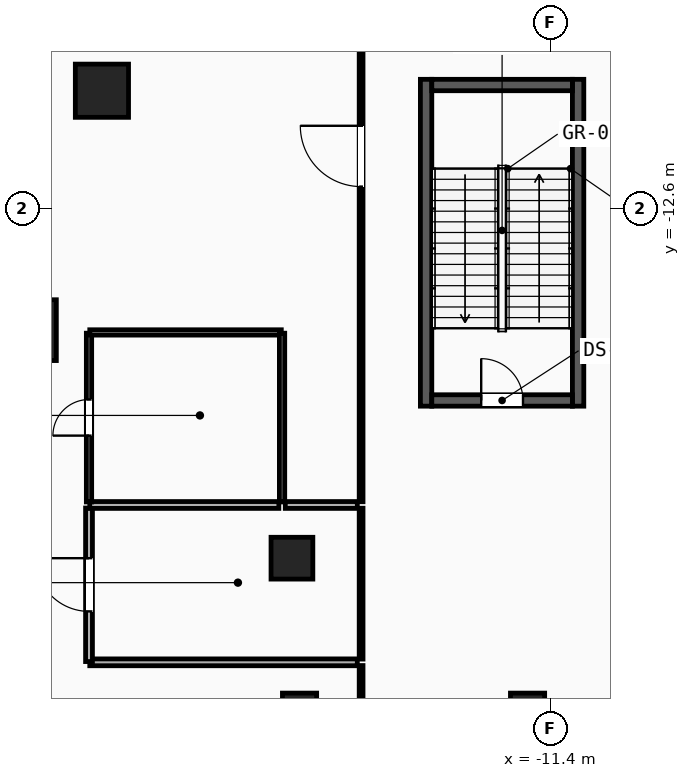
"""IFC4 building model, lengths in metres.
Left out: names, types, materials, properties, quantities, classifications, styles, units other than length and angle.
Written with IfcOpenShell. Run it as: python <this file> out.ifc"""

import sys

from ifc_helpers import new_model, si_unit, direction, frame, frame_2d, origin, origin_2d, place, context, subcontext, project, spatial, rectangle, circle, extrude, element, fill, save


model = new_model("IFC4")
c1 = context("Model", 3, precision=1e-05, world=origin(), true_north=direction((0.0, 1.0)))
c2 = subcontext(c1, "Body", "Model", "MODEL_VIEW")
j1 = project(units=[si_unit("LENGTHUNIT", "METRE"), si_unit("PLANEANGLEUNIT", "RADIAN")], contexts=[c1])
p1 = place(None, origin())
s1 = spatial("IfcSite", under=j1, at=p1, CompositionType="ELEMENT")
p2 = place(p1, origin())
s2 = spatial("IfcBuilding", under=s1, at=p2, CompositionType="ELEMENT")
p3 = place(p2, origin())
s3 = spatial("IfcBuildingStorey", under=s2, at=p3, CompositionType="ELEMENT", Elevation=0.0)
p4 = place(p3, frame((-23.2, -9.5, 0.0), z_axis=(0.0, 0.0, 1.0), x_axis=(1.0, 0.0, 0.0)))
e1 = element("IfcColumn", 1, at=p4, inside=s3, PredefinedType="COLUMN", context=c2, shape_type="SweptSolid", body=[
    extrude(rectangle(XDim=1.4, YDim=1.4, at=origin_2d()), origin(), (0.0, 0.0, 1.0), 6.0),
])
p5 = place(p3, frame((-25.2, -15.8, 0.0), z_axis=(0.0, 0.0, 1.0), x_axis=(1.0, 0.0, 0.0)))
e2 = element("IfcColumn", 2, at=p5, inside=s3, PredefinedType="COLUMN", context=c2, shape_type="SweptSolid", body=[
    extrude(rectangle(XDim=1.6, YDim=1.6, at=origin_2d()), origin(), (0.0, 0.0, 1.0), 6.0),
])
p6 = place(p3, frame((-18.2, -21.8, 0.0), z_axis=(0.0, 0.0, 1.0), x_axis=(1.0, 0.0, 0.0)))
e3 = element("IfcColumn", 3, at=p6, inside=s3, PredefinedType="PILASTER", context=c2, shape_type="SweptSolid", body=[
    extrude(circle(Radius=0.55, at=origin_2d()), origin(), (0.0, 0.0, 1.0), 6.0),
])
for number, where, z_axis, x_axis in (
    (4, (-18.0, -25.8, 0.0), (0.0, 0.0, 1.0), (1.0, 0.0, 0.0)),
    (5, (-12.0, -25.8, 0.0), (0.0, 0.0, 1.0), (1.0, 0.0, 0.0)),
):
    element("IfcColumn", number, at=place(p3, frame(where, z_axis=z_axis, x_axis=x_axis)), inside=s3, PredefinedType="COLUMN", context=c2, shape_type="SweptSolid", body=[
        extrude(rectangle(XDim=0.9, YDim=0.9, at=origin_2d()), origin(), (0.0, 0.0, 1.0), 5.65),
    ])
for number, where, z_axis, x_axis in (
    (6, (-14.67, -17.8, 0.0), (0.0, 0.0, 1.0), (0.0, 1.0, 0.0)),
    (7, (-10.67, -17.8, 0.0), (0.0, 0.0, 1.0), (0.0, 1.0, 0.0)),
):
    element("IfcWall", number, at=place(p3, frame(where, z_axis=z_axis, x_axis=x_axis)), inside=s3, PredefinedType="SHEAR", context=c2, shape_type="SweptSolid", body=[
        extrude(rectangle(XDim=8.6, YDim=0.3, at=frame_2d((4.3, 0.0))), origin(), (0.0, 0.0, 1.0), 5.65),
    ])
p7 = place(p3, frame((-14.52, -17.65, 0.0), z_axis=(0.0, 0.0, 1.0), x_axis=(1.0, 0.0, 0.0)))
e8 = element("IfcWall", 8, at=p7, inside=s3, PredefinedType="SHEAR", context=c2, shape_type="SweptSolid", body=[
    extrude(rectangle(XDim=3.7, YDim=0.3, at=frame_2d((1.85, 0.0))), origin(), (0.0, 0.0, 1.0), 5.65),
])
p8 = place(p7, frame((1.3, 0.0, 0.0)))
e9 = element("IfcOpeningElement", 9, at=p8, cuts=e8, PredefinedType="OPENING", context=c2, shape_type="SweptSolid", body=[
    extrude(rectangle(XDim=1.1, YDim=2.15, at=frame_2d((0.55, 1.075))), frame((0.0, 0.16, 0.0), z_axis=(0.0, -1.0, 0.0), x_axis=(1.0, 0.0, 0.0)), (0.0, 0.0, 1.0), 0.32),
])
p9 = place(p3, frame((-14.52, -9.35, 0.0), z_axis=(0.0, 0.0, 1.0), x_axis=(1.0, 0.0, 0.0)))
e10 = element("IfcWall", 10, at=p9, inside=s3, PredefinedType="SHEAR", context=c2, shape_type="SweptSolid", body=[
    extrude(rectangle(XDim=3.7, YDim=0.3, at=frame_2d((1.85, 0.0))), origin(), (0.0, 0.0, 1.0), 5.65),
])
p10 = place(p3, frame((-23.52, -24.54, 0.0), z_axis=(0.0, 0.0, 1.0), x_axis=(1.0, 0.0, 0.0)))
e11 = element("IfcWall", 11, at=p10, inside=s3, PredefinedType="PARTITIONING", context=c2, shape_type="SweptSolid", body=[
    extrude(rectangle(XDim=7.04, YDim=0.18, at=frame_2d((3.52, 0.0))), origin(), (0.0, 0.0, 1.0), 5.65),
])
p11 = place(p3, frame((-23.54, -24.52, 0.0), z_axis=(0.0, 0.0, 1.0), x_axis=(0.0, 1.0, 0.0)))
e12 = element("IfcWall", 12, at=p11, inside=s3, PredefinedType="PARTITIONING", context=c2, shape_type="SweptSolid", body=[
    extrude(rectangle(XDim=4.04, YDim=0.18, at=frame_2d((2.02, 0.0))), origin(), (0.0, 0.0, 1.0), 5.65),
])
p12 = place(p11, frame((1.32, 0.0, 0.0)))
e13 = element("IfcOpeningElement", 13, at=p12, cuts=e12, PredefinedType="OPENING", context=c2, shape_type="SweptSolid", body=[
    extrude(rectangle(XDim=1.4, YDim=2.2, at=frame_2d((0.7, 1.1))), frame((0.0, 0.1, 0.0), z_axis=(0.0, -1.0, 0.0), x_axis=(1.0, 0.0, 0.0)), (0.0, 0.0, 1.0), 0.2),
])
p13 = place(p3, frame((-23.52, -20.4, 0.0), z_axis=(0.0, 0.0, 1.0), x_axis=(1.0, 0.0, 0.0)))
e14 = element("IfcWall", 14, at=p13, inside=s3, PredefinedType="PARTITIONING", context=c2, shape_type="SweptSolid", body=[
    extrude(rectangle(XDim=4.975, YDim=0.18, at=frame_2d((2.488, 0.0))), origin(), (0.0, 0.0, 1.0), 5.65),
])
p14 = place(p3, frame((-18.375, -20.4, 0.0), z_axis=(0.0, 0.0, 1.0), x_axis=(1.0, 0.0, 0.0)))
e15 = element("IfcWall", 15, at=p14, inside=s3, PredefinedType="PARTITIONING", context=c2, shape_type="SweptSolid", body=[
    extrude(rectangle(XDim=1.895, YDim=0.18, at=frame_2d((0.948, 0.0))), origin(), (0.0, 0.0, 1.0), 5.65),
])
p15 = place(p3, frame((-23.54, -20.32, 0.0), z_axis=(0.0, 0.0, 1.0), x_axis=(0.0, 1.0, 0.0)))
e16 = element("IfcWall", 16, at=p15, inside=s3, PredefinedType="PARTITIONING", context=c2, shape_type="SweptSolid", body=[
    extrude(rectangle(XDim=4.44, YDim=0.14, at=frame_2d((2.22, 0.0))), origin(), (0.0, 0.0, 1.0), 5.65),
])
p16 = place(p15, frame((1.745, 0.0, 0.0)))
e17 = element("IfcOpeningElement", 17, at=p16, cuts=e16, PredefinedType="OPENING", context=c2, shape_type="SweptSolid", body=[
    extrude(rectangle(XDim=0.95, YDim=2.1, at=frame_2d((0.475, 1.05))), frame((0.0, 0.08, 0.0), z_axis=(0.0, -1.0, 0.0), x_axis=(1.0, 0.0, 0.0)), (0.0, 0.0, 1.0), 0.16),
])
p17 = place(p3, frame((-23.52, -15.86, 0.0), z_axis=(0.0, 0.0, 1.0), x_axis=(1.0, 0.0, 0.0)))
e18 = element("IfcWall", 18, at=p17, inside=s3, PredefinedType="PARTITIONING", context=c2, shape_type="SweptSolid", body=[
    extrude(rectangle(XDim=5.04, YDim=0.14, at=frame_2d((2.52, 0.0))), origin(), (0.0, 0.0, 1.0), 5.65),
])
p18 = place(p3, frame((-18.46, -20.32, 0.0), z_axis=(0.0, 0.0, 1.0), x_axis=(0.0, 1.0, 0.0)))
e19 = element("IfcWall", 19, at=p18, inside=s3, PredefinedType="PARTITIONING", context=c2, shape_type="SweptSolid", body=[
    extrude(rectangle(XDim=4.44, YDim=0.14, at=frame_2d((2.22, 0.0))), origin(), (0.0, 0.0, 1.0), 5.65),
])
p19 = place(p3, frame((-16.38, -28.745, 0.0), z_axis=(0.0, 0.0, 1.0), x_axis=(0.0, 1.0, 0.0)))
e20 = element("IfcWall", 20, at=p19, inside=s3, PredefinedType="PARTITIONING", context=c2, shape_type="SweptSolid", body=[
    extrude(rectangle(XDim=4.12, YDim=0.1, at=frame_2d((2.06, 0.0))), origin(), (0.0, 0.0, 1.0), 5.65),
])
p20 = place(p3, frame((-16.38, -24.455, 0.0), z_axis=(0.0, 0.0, 1.0), x_axis=(0.0, 1.0, 0.0)))
e21 = element("IfcWall", 21, at=p20, inside=s3, PredefinedType="PARTITIONING", context=c2, shape_type="SweptSolid", body=[
    extrude(rectangle(XDim=3.97, YDim=0.1, at=frame_2d((1.985, 0.0))), origin(), (0.0, 0.0, 1.0), 5.65),
])
p21 = place(p3, frame((-16.38, -20.315, 0.0), z_axis=(0.0, 0.0, 1.0), x_axis=(0.0, 1.0, 0.0)))
e22 = element("IfcWall", 22, at=p21, inside=s3, PredefinedType="PARTITIONING", context=c2, shape_type="SweptSolid", body=[
    extrude(rectangle(XDim=18.185, YDim=0.1, at=frame_2d((9.093, 0.0))), origin(), (0.0, 0.0, 1.0), 5.65),
])
p22 = place(p21, frame((8.292, 0.0, 0.0)))
e23 = element("IfcOpeningElement", 23, at=p22, cuts=e22, PredefinedType="OPENING", context=c2, shape_type="SweptSolid", body=[
    extrude(rectangle(XDim=1.6, YDim=2.2, at=frame_2d((0.8, 1.1))), frame((0.0, 0.06, 0.0), z_axis=(0.0, -1.0, 0.0), x_axis=(1.0, 0.0, 0.0)), (0.0, 0.0, 1.0), 0.12),
])
p23 = place(p8, origin())
e24 = element("IfcDoor", 24, at=p23, inside=s3, OperationType="SINGLE_SWING_LEFT", PredefinedType="DOOR", context=c2, shape_type="SweptSolid", body=[
    extrude(rectangle(XDim=1.1, YDim=2.15, at=frame_2d((0.55, 1.075))), frame((0.0, 0.025, 0.0), z_axis=(0.0, -1.0, 0.0), x_axis=(1.0, 0.0, 0.0)), (0.0, 0.0, 1.0), 0.05),
])
fill(e9, e24)
p24 = place(p22, origin())
e25 = element("IfcDoor", 25, at=p24, inside=s3, OperationType="SINGLE_SWING_RIGHT", PredefinedType="DOOR", context=c2, shape_type="SweptSolid", body=[
    extrude(rectangle(XDim=1.6, YDim=2.2, at=frame_2d((0.8, 1.1))), frame((0.0, 0.025, 0.0), z_axis=(0.0, -1.0, 0.0), x_axis=(1.0, 0.0, 0.0)), (0.0, 0.0, 1.0), 0.05),
])
fill(e23, e25)
p25 = place(p16, origin())
e26 = element("IfcDoor", 26, at=p25, inside=s3, OperationType="SINGLE_SWING_LEFT", PredefinedType="DOOR", context=c2, shape_type="SweptSolid", body=[
    extrude(rectangle(XDim=0.95, YDim=2.1, at=frame_2d((0.475, 1.05))), frame((0.0, 0.025, 0.0), z_axis=(0.0, -1.0, 0.0), x_axis=(1.0, 0.0, 0.0)), (0.0, 0.0, 1.0), 0.05),
])
fill(e17, e26)
p26 = place(p12, origin())
e27 = element("IfcDoor", 27, at=p26, inside=s3, OperationType="SINGLE_SWING_RIGHT", PredefinedType="DOOR", context=c2, shape_type="SweptSolid", body=[
    extrude(rectangle(XDim=1.4, YDim=2.2, at=frame_2d((0.7, 1.1))), frame((0.0, 0.025, 0.0), z_axis=(0.0, -1.0, 0.0), x_axis=(1.0, 0.0, 0.0)), (0.0, 0.0, 1.0), 0.05),
])
fill(e13, e27)
save(model, sys.argv[1])
